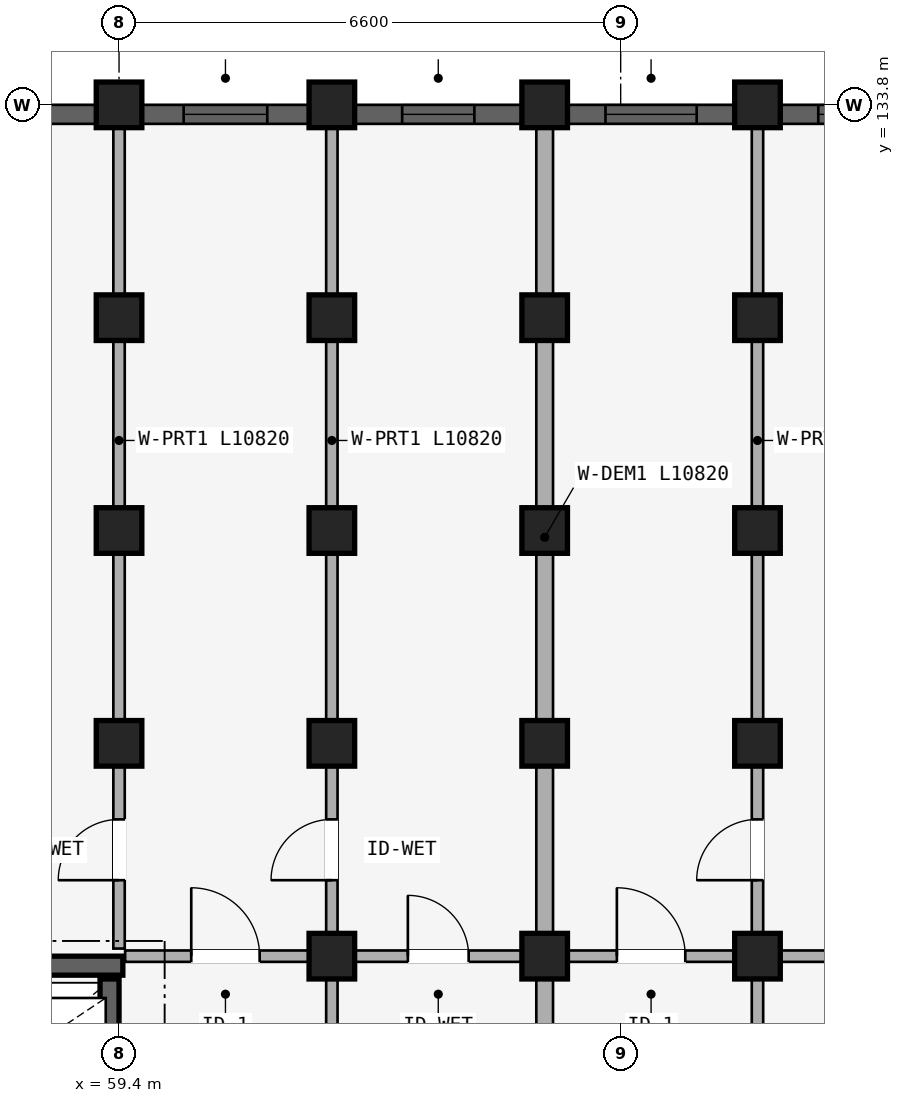
"""IFC4 building model, lengths in metres.
Left out: names, types, materials, properties, quantities, classifications, styles, units other than length and angle.
Written with IfcOpenShell. Run it as: python <this file> out.ifc"""

import sys

from ifc_helpers import new_model, si_unit, direction, frame, frame_2d, origin, origin_2d, place, context, subcontext, project, spatial, rectangle, extrude, element, fill, save


model = new_model("IFC4")
c1 = context("Model", 3, precision=1e-05, world=origin(), true_north=direction((0.0, 1.0)))
c2 = subcontext(c1, "Body", "Model", "MODEL_VIEW")
j1 = project(units=[si_unit("LENGTHUNIT", "METRE"), si_unit("PLANEANGLEUNIT", "RADIAN")], contexts=[c1])
p1 = place(None, origin())
s1 = spatial("IfcSite", under=j1, at=p1, CompositionType="ELEMENT")
p2 = place(p1, origin())
s2 = spatial("IfcBuilding", under=s1, at=p2, CompositionType="ELEMENT")
p3 = place(p2, frame((0.0, 0.0, 37.05)))
s3 = spatial("IfcBuildingStorey", under=s2, at=p3, CompositionType="ELEMENT", Elevation=37.05)
p4 = place(p3, frame((56.65, 122.475, 0.0), z_axis=(0.0, 0.0, 1.0), x_axis=(1.0, 0.0, 0.0)))
e1 = element("IfcWall", 1, at=p4, inside=s3, PredefinedType="SHEAR", context=c2, shape_type="SweptSolid", body=[
    extrude(rectangle(XDim=2.8, YDim=0.25, at=frame_2d((1.4, 0.0))), origin(), (0.0, 0.0, 1.0), 2.93),
])
p5 = place(p3, frame((59.275, 120.15, 0.0), z_axis=(0.0, 0.0, 1.0), x_axis=(0.0, 1.0, 0.0)))
e2 = element("IfcWall", 2, at=p5, inside=s3, PredefinedType="SHEAR", context=c2, shape_type="SweptSolid", body=[
    extrude(rectangle(XDim=2.15, YDim=0.25, at=frame_2d((1.075, 0.0))), origin(), (0.0, 0.0, 1.0), 2.93),
])
for number, where, z_axis, x_axis in (
    (3, (59.4, 125.4, 0.0), (0.0, 0.0, 1.0), (1.0, 0.0, 0.0)),
    (4, (59.4, 128.2, 0.0), (0.0, 0.0, 1.0), (1.0, 0.0, 0.0)),
    (5, (59.4, 131.0, 0.0), (0.0, 0.0, 1.0), (1.0, 0.0, 0.0)),
):
    element("IfcColumn", number, at=place(p3, frame(where, z_axis=z_axis, x_axis=x_axis)), inside=s3, PredefinedType="COLUMN", context=c2, shape_type="SweptSolid", body=[
        extrude(rectangle(XDim=0.6, YDim=0.6, at=origin_2d()), origin(), (0.0, 0.0, 1.0), 2.93),
    ])
p6 = place(p3, frame((59.4, 133.8, 0.0), z_axis=(0.0, 0.0, 1.0), x_axis=(1.0, 0.0, 0.0)))
e6 = element("IfcColumn", 6, at=p6, inside=s3, PredefinedType="COLUMN", context=c2, shape_type="SweptSolid", body=[
    extrude(rectangle(XDim=0.6, YDim=0.6, at=origin_2d()), origin(), (0.0, 0.0, 1.0), 2.97),
])
for number, where, z_axis, x_axis in (
    (7, (62.2, 122.6, 0.0), (0.0, 0.0, 1.0), (1.0, 0.0, 0.0)),
    (8, (62.2, 125.4, 0.0), (0.0, 0.0, 1.0), (1.0, 0.0, 0.0)),
    (9, (62.2, 128.2, 0.0), (0.0, 0.0, 1.0), (1.0, 0.0, 0.0)),
    (10, (62.2, 131.0, 0.0), (0.0, 0.0, 1.0), (1.0, 0.0, 0.0)),
):
    element("IfcColumn", number, at=place(p3, frame(where, z_axis=z_axis, x_axis=x_axis)), inside=s3, PredefinedType="COLUMN", context=c2, shape_type="SweptSolid", body=[
        extrude(rectangle(XDim=0.6, YDim=0.6, at=origin_2d()), origin(), (0.0, 0.0, 1.0), 2.93),
    ])
p7 = place(p3, frame((62.2, 133.8, 0.0), z_axis=(0.0, 0.0, 1.0), x_axis=(1.0, 0.0, 0.0)))
e11 = element("IfcColumn", 11, at=p7, inside=s3, PredefinedType="COLUMN", context=c2, shape_type="SweptSolid", body=[
    extrude(rectangle(XDim=0.6, YDim=0.6, at=origin_2d()), origin(), (0.0, 0.0, 1.0), 2.97),
])
for number, where, z_axis, x_axis in (
    (12, (65.0, 122.6, 0.0), (0.0, 0.0, 1.0), (1.0, 0.0, 0.0)),
    (13, (65.0, 125.4, 0.0), (0.0, 0.0, 1.0), (1.0, 0.0, 0.0)),
    (14, (65.0, 128.2, 0.0), (0.0, 0.0, 1.0), (1.0, 0.0, 0.0)),
    (15, (65.0, 131.0, 0.0), (0.0, 0.0, 1.0), (1.0, 0.0, 0.0)),
):
    element("IfcColumn", number, at=place(p3, frame(where, z_axis=z_axis, x_axis=x_axis)), inside=s3, PredefinedType="COLUMN", context=c2, shape_type="SweptSolid", body=[
        extrude(rectangle(XDim=0.6, YDim=0.6, at=origin_2d()), origin(), (0.0, 0.0, 1.0), 2.93),
    ])
p8 = place(p3, frame((65.0, 133.8, 0.0), z_axis=(0.0, 0.0, 1.0), x_axis=(1.0, 0.0, 0.0)))
e16 = element("IfcColumn", 16, at=p8, inside=s3, PredefinedType="COLUMN", context=c2, shape_type="SweptSolid", body=[
    extrude(rectangle(XDim=0.6, YDim=0.6, at=origin_2d()), origin(), (0.0, 0.0, 1.0), 2.97),
])
for number, where, z_axis, x_axis in (
    (17, (67.8, 122.6, 0.0), (0.0, 0.0, 1.0), (1.0, 0.0, 0.0)),
    (18, (67.8, 125.4, 0.0), (0.0, 0.0, 1.0), (1.0, 0.0, 0.0)),
    (19, (67.8, 128.2, 0.0), (0.0, 0.0, 1.0), (1.0, 0.0, 0.0)),
    (20, (67.8, 131.0, 0.0), (0.0, 0.0, 1.0), (1.0, 0.0, 0.0)),
):
    element("IfcColumn", number, at=place(p3, frame(where, z_axis=z_axis, x_axis=x_axis)), inside=s3, PredefinedType="COLUMN", context=c2, shape_type="SweptSolid", body=[
        extrude(rectangle(XDim=0.6, YDim=0.6, at=origin_2d()), origin(), (0.0, 0.0, 1.0), 2.93),
    ])
p9 = place(p3, frame((67.8, 133.8, 0.0), z_axis=(0.0, 0.0, 1.0), x_axis=(1.0, 0.0, 0.0)))
e21 = element("IfcColumn", 21, at=p9, inside=s3, PredefinedType="COLUMN", context=c2, shape_type="SweptSolid", body=[
    extrude(rectangle(XDim=0.6, YDim=0.6, at=origin_2d()), origin(), (0.0, 0.0, 1.0), 2.97),
])
p10 = place(p3, frame((59.48, 122.6, 0.0), z_axis=(0.0, 0.0, 1.0), x_axis=(1.0, 0.0, 0.0)))
e22 = element("IfcWall", 22, at=p10, inside=s3, PredefinedType="PLUMBINGWALL", context=c2, shape_type="SweptSolid", body=[
    extrude(rectangle(XDim=2.64, YDim=0.15, at=frame_2d((1.32, 0.0))), origin(), (0.0, 0.0, 1.0), 2.372),
])
p11 = place(p10, frame((0.87, 0.0, 0.0)))
e23 = element("IfcOpeningElement", 23, at=p11, cuts=e22, PredefinedType="OPENING", context=c2, shape_type="SweptSolid", body=[
    extrude(rectangle(XDim=0.9, YDim=2.1, at=frame_2d((0.45, 1.05))), frame((0.0, 0.085, 0.0), z_axis=(0.0, -1.0, 0.0), x_axis=(1.0, 0.0, 0.0)), (0.0, 0.0, 1.0), 0.17),
])
p12 = place(p3, frame((62.28, 122.6, 0.0), z_axis=(0.0, 0.0, 1.0), x_axis=(1.0, 0.0, 0.0)))
e24 = element("IfcWall", 24, at=p12, inside=s3, PredefinedType="PLUMBINGWALL", context=c2, shape_type="SweptSolid", body=[
    extrude(rectangle(XDim=2.64, YDim=0.15, at=frame_2d((1.32, 0.0))), origin(), (0.0, 0.0, 1.0), 2.372),
])
p13 = place(p12, frame((0.92, 0.0, 0.0)))
e25 = element("IfcOpeningElement", 25, at=p13, cuts=e24, PredefinedType="OPENING", context=c2, shape_type="SweptSolid", body=[
    extrude(rectangle(XDim=0.8, YDim=2.1, at=frame_2d((0.4, 1.05))), frame((0.0, 0.085, 0.0), z_axis=(0.0, -1.0, 0.0), x_axis=(1.0, 0.0, 0.0)), (0.0, 0.0, 1.0), 0.17),
])
p14 = place(p3, frame((65.08, 122.6, 0.0), z_axis=(0.0, 0.0, 1.0), x_axis=(1.0, 0.0, 0.0)))
e26 = element("IfcWall", 26, at=p14, inside=s3, PredefinedType="PLUMBINGWALL", context=c2, shape_type="SweptSolid", body=[
    extrude(rectangle(XDim=2.64, YDim=0.15, at=frame_2d((1.32, 0.0))), origin(), (0.0, 0.0, 1.0), 2.372),
])
p15 = place(p14, frame((0.87, 0.0, 0.0)))
e27 = element("IfcOpeningElement", 27, at=p15, cuts=e26, PredefinedType="OPENING", context=c2, shape_type="SweptSolid", body=[
    extrude(rectangle(XDim=0.9, YDim=2.1, at=frame_2d((0.45, 1.05))), frame((0.0, 0.085, 0.0), z_axis=(0.0, -1.0, 0.0), x_axis=(1.0, 0.0, 0.0)), (0.0, 0.0, 1.0), 0.17),
])
p16 = place(p3, frame((67.88, 122.6, 0.0), z_axis=(0.0, 0.0, 1.0), x_axis=(1.0, 0.0, 0.0)))
e28 = element("IfcWall", 28, at=p16, inside=s3, PredefinedType="PLUMBINGWALL", context=c2, shape_type="SweptSolid", body=[
    extrude(rectangle(XDim=2.64, YDim=0.15, at=frame_2d((1.32, 0.0))), origin(), (0.0, 0.0, 1.0), 2.372),
])
p17 = place(p16, frame((0.92, 0.0, 0.0)))
e29 = element("IfcOpeningElement", 29, at=p17, cuts=e28, PredefinedType="OPENING", context=c2, shape_type="SweptSolid", body=[
    extrude(rectangle(XDim=0.8, YDim=2.1, at=frame_2d((0.4, 1.05))), frame((0.0, 0.085, 0.0), z_axis=(0.0, -1.0, 0.0), x_axis=(1.0, 0.0, 0.0)), (0.0, 0.0, 1.0), 0.17),
])
p18 = place(p3, frame((59.4, 122.7, 0.0), z_axis=(0.0, 0.0, 1.0), x_axis=(0.0, 1.0, 0.0)))
e30 = element("IfcWall", 30, at=p18, inside=s3, PredefinedType="PARTITIONING", context=c2, shape_type="SweptSolid", body=[
    extrude(rectangle(XDim=10.82, YDim=0.15, at=frame_2d((5.41, 0.0))), origin(), (0.0, 0.0, 1.0), 2.372),
])
p19 = place(p18, frame((0.899, 0.0, 0.0)))
e31 = element("IfcOpeningElement", 31, at=p19, cuts=e30, PredefinedType="OPENING", context=c2, shape_type="SweptSolid", body=[
    extrude(rectangle(XDim=0.8, YDim=2.1, at=frame_2d((0.4, 1.05))), frame((0.0, 0.085, 0.0), z_axis=(0.0, -1.0, 0.0), x_axis=(1.0, 0.0, 0.0)), (0.0, 0.0, 1.0), 0.17),
])
p20 = place(p3, frame((62.2, 116.05, 0.0), z_axis=(0.0, 0.0, 1.0), x_axis=(0.0, 1.0, 0.0)))
e32 = element("IfcWall", 32, at=p20, inside=s3, PredefinedType="PARTITIONING", context=c2, shape_type="SweptSolid", body=[
    extrude(rectangle(XDim=6.53, YDim=0.15, at=frame_2d((3.265, 0.0))), origin(), (0.0, 0.0, 1.0), 2.372),
])
p21 = place(p20, frame((2.815, 0.0, 0.0)))
e33 = element("IfcOpeningElement", 33, at=p21, cuts=e32, PredefinedType="OPENING", context=c2, shape_type="SweptSolid", body=[
    extrude(rectangle(XDim=0.9, YDim=2.1, at=frame_2d((0.45, 1.05))), frame((0.0, 0.085, 0.0), z_axis=(0.0, -1.0, 0.0), x_axis=(1.0, 0.0, 0.0)), (0.0, 0.0, 1.0), 0.17),
])
p22 = place(p3, frame((62.2, 122.7, 0.0), z_axis=(0.0, 0.0, 1.0), x_axis=(0.0, 1.0, 0.0)))
e34 = element("IfcWall", 34, at=p22, inside=s3, PredefinedType="PARTITIONING", context=c2, shape_type="SweptSolid", body=[
    extrude(rectangle(XDim=10.82, YDim=0.15, at=frame_2d((5.41, 0.0))), origin(), (0.0, 0.0, 1.0), 2.372),
])
p23 = place(p22, frame((0.899, 0.0, 0.0)))
e35 = element("IfcOpeningElement", 35, at=p23, cuts=e34, PredefinedType="OPENING", context=c2, shape_type="SweptSolid", body=[
    extrude(rectangle(XDim=0.8, YDim=2.1, at=frame_2d((0.4, 1.05))), frame((0.0, 0.085, 0.0), z_axis=(0.0, -1.0, 0.0), x_axis=(1.0, 0.0, 0.0)), (0.0, 0.0, 1.0), 0.17),
])
p24 = place(p3, frame((65.0, 116.05, 0.0), z_axis=(0.0, 0.0, 1.0), x_axis=(0.0, 1.0, 0.0)))
e36 = element("IfcWall", 36, at=p24, inside=s3, PredefinedType="STANDARD", context=c2, shape_type="SweptSolid", body=[
    extrude(rectangle(XDim=6.53, YDim=0.22, at=frame_2d((3.265, 0.0))), origin(), (0.0, 0.0, 1.0), 2.372),
])
p25 = place(p3, frame((65.0, 122.7, 0.0), z_axis=(0.0, 0.0, 1.0), x_axis=(0.0, 1.0, 0.0)))
e37 = element("IfcWall", 37, at=p25, inside=s3, PredefinedType="STANDARD", context=c2, shape_type="SweptSolid", body=[
    extrude(rectangle(XDim=10.82, YDim=0.22, at=frame_2d((5.41, 0.0))), origin(), (0.0, 0.0, 1.0), 2.372),
])
p26 = place(p3, frame((67.8, 116.05, 0.0), z_axis=(0.0, 0.0, 1.0), x_axis=(0.0, 1.0, 0.0)))
e38 = element("IfcWall", 38, at=p26, inside=s3, PredefinedType="PARTITIONING", context=c2, shape_type="SweptSolid", body=[
    extrude(rectangle(XDim=6.53, YDim=0.15, at=frame_2d((3.265, 0.0))), origin(), (0.0, 0.0, 1.0), 2.372),
])
p27 = place(p26, frame((2.815, 0.0, 0.0)))
e39 = element("IfcOpeningElement", 39, at=p27, cuts=e38, PredefinedType="OPENING", context=c2, shape_type="SweptSolid", body=[
    extrude(rectangle(XDim=0.9, YDim=2.1, at=frame_2d((0.45, 1.05))), frame((0.0, 0.085, 0.0), z_axis=(0.0, -1.0, 0.0), x_axis=(1.0, 0.0, 0.0)), (0.0, 0.0, 1.0), 0.17),
])
p28 = place(p3, frame((67.8, 122.7, 0.0), z_axis=(0.0, 0.0, 1.0), x_axis=(0.0, 1.0, 0.0)))
e40 = element("IfcWall", 40, at=p28, inside=s3, PredefinedType="PARTITIONING", context=c2, shape_type="SweptSolid", body=[
    extrude(rectangle(XDim=10.82, YDim=0.15, at=frame_2d((5.41, 0.0))), origin(), (0.0, 0.0, 1.0), 2.372),
])
p29 = place(p28, frame((0.899, 0.0, 0.0)))
e41 = element("IfcOpeningElement", 41, at=p29, cuts=e40, PredefinedType="OPENING", context=c2, shape_type="SweptSolid", body=[
    extrude(rectangle(XDim=0.8, YDim=2.1, at=frame_2d((0.4, 1.05))), frame((0.0, 0.085, 0.0), z_axis=(0.0, -1.0, 0.0), x_axis=(1.0, 0.0, 0.0)), (0.0, 0.0, 1.0), 0.17),
])
p30 = place(p3, frame((54.104, 133.675, 0.0), z_axis=(0.0, 0.0, 1.0), x_axis=(1.0, 0.0, 0.0)))
e42 = element("IfcWall", 42, at=p30, inside=s3, PredefinedType="STANDARD", context=c2, shape_type="SweptSolid", body=[
    extrude(rectangle(XDim=4.993, YDim=0.25, at=frame_2d((2.497, 0.0))), origin(), (0.0, 0.0, 1.0), 2.48),
])
p31 = place(p30, frame((1.896, 0.0, 0.78)))
e43 = element("IfcOpeningElement", 43, at=p31, cuts=e42, PredefinedType="OPENING", context=c2, shape_type="SweptSolid", body=[
    extrude(rectangle(XDim=1.2, YDim=1.5, at=frame_2d((0.6, 0.75))), frame((0.0, 0.135, 0.0), z_axis=(0.0, -1.0, 0.0), x_axis=(1.0, 0.0, 0.0)), (0.0, 0.0, 1.0), 0.27),
])
p32 = place(p3, frame((59.704, 133.675, 0.0), z_axis=(0.0, 0.0, 1.0), x_axis=(1.0, 0.0, 0.0)))
e44 = element("IfcWall", 44, at=p32, inside=s3, PredefinedType="STANDARD", context=c2, shape_type="SweptSolid", body=[
    extrude(rectangle(XDim=2.193, YDim=0.25, at=frame_2d((1.096, 0.0))), origin(), (0.0, 0.0, 1.0), 2.48),
])
p33 = place(p32, frame((0.546, 0.0, 0.83)))
e45 = element("IfcOpeningElement", 45, at=p33, cuts=e44, PredefinedType="OPENING", context=c2, shape_type="SweptSolid", body=[
    extrude(rectangle(XDim=1.1, YDim=1.45, at=frame_2d((0.55, 0.725))), frame((0.0, 0.135, 0.0), z_axis=(0.0, -1.0, 0.0), x_axis=(1.0, 0.0, 0.0)), (0.0, 0.0, 1.0), 0.27),
])
p34 = place(p3, frame((62.503, 133.675, 0.0), z_axis=(0.0, 0.0, 1.0), x_axis=(1.0, 0.0, 0.0)))
e46 = element("IfcWall", 46, at=p34, inside=s3, PredefinedType="STANDARD", context=c2, shape_type="SweptSolid", body=[
    extrude(rectangle(XDim=2.193, YDim=0.25, at=frame_2d((1.097, 0.0))), origin(), (0.0, 0.0, 1.0), 2.48),
])
p35 = place(p34, frame((0.622, 0.0, 0.88)))
e47 = element("IfcOpeningElement", 47, at=p35, cuts=e46, PredefinedType="OPENING", context=c2, shape_type="SweptSolid", body=[
    extrude(rectangle(XDim=0.95, YDim=1.35, at=frame_2d((0.475, 0.675))), frame((0.0, 0.135, 0.0), z_axis=(0.0, -1.0, 0.0), x_axis=(1.0, 0.0, 0.0)), (0.0, 0.0, 1.0), 0.27),
])
p36 = place(p3, frame((65.303, 133.675, 0.0), z_axis=(0.0, 0.0, 1.0), x_axis=(1.0, 0.0, 0.0)))
e48 = element("IfcWall", 48, at=p36, inside=s3, PredefinedType="STANDARD", context=c2, shape_type="SweptSolid", body=[
    extrude(rectangle(XDim=2.193, YDim=0.25, at=frame_2d((1.097, 0.0))), origin(), (0.0, 0.0, 1.0), 2.48),
])
p37 = place(p36, frame((0.497, 0.0, 0.78)))
e49 = element("IfcOpeningElement", 49, at=p37, cuts=e48, PredefinedType="OPENING", context=c2, shape_type="SweptSolid", body=[
    extrude(rectangle(XDim=1.2, YDim=1.5, at=frame_2d((0.6, 0.75))), frame((0.0, 0.135, 0.0), z_axis=(0.0, -1.0, 0.0), x_axis=(1.0, 0.0, 0.0)), (0.0, 0.0, 1.0), 0.27),
])
p38 = place(p3, frame((68.104, 133.675, 0.0), z_axis=(0.0, 0.0, 1.0), x_axis=(1.0, 0.0, 0.0)))
e50 = element("IfcWall", 50, at=p38, inside=s3, PredefinedType="STANDARD", context=c2, shape_type="SweptSolid", body=[
    extrude(rectangle(XDim=2.193, YDim=0.25, at=frame_2d((1.096, 0.0))), origin(), (0.0, 0.0, 1.0), 2.48),
])
p39 = place(p38, frame((0.497, 0.0, 0.78)))
e51 = element("IfcOpeningElement", 51, at=p39, cuts=e50, PredefinedType="OPENING", context=c2, shape_type="SweptSolid", body=[
    extrude(rectangle(XDim=1.2, YDim=1.5, at=frame_2d((0.6, 0.75))), frame((0.0, 0.135, 0.0), z_axis=(0.0, -1.0, 0.0), x_axis=(1.0, 0.0, 0.0)), (0.0, 0.0, 1.0), 0.27),
])
p40 = place(p33, origin())
e52 = element("IfcWindow", 52, at=p40, inside=s3, PartitioningType="SINGLE_PANEL", PredefinedType="WINDOW", context=c2, shape_type="SweptSolid", body=[
    extrude(rectangle(XDim=1.1, YDim=1.45, at=frame_2d((0.55, 0.725))), frame((0.0, 0.03, 0.0), z_axis=(0.0, -1.0, 0.0), x_axis=(1.0, 0.0, 0.0)), (0.0, 0.0, 1.0), 0.06),
])
fill(e45, e52)
p41 = place(p35, origin())
e53 = element("IfcWindow", 53, at=p41, inside=s3, PartitioningType="SINGLE_PANEL", PredefinedType="WINDOW", context=c2, shape_type="SweptSolid", body=[
    extrude(rectangle(XDim=0.95, YDim=1.35, at=frame_2d((0.475, 0.675))), frame((0.0, 0.03, 0.0), z_axis=(0.0, -1.0, 0.0), x_axis=(1.0, 0.0, 0.0)), (0.0, 0.0, 1.0), 0.06),
])
fill(e47, e53)
p42 = place(p37, origin())
e54 = element("IfcWindow", 54, at=p42, inside=s3, PartitioningType="SINGLE_PANEL", PredefinedType="WINDOW", context=c2, shape_type="SweptSolid", body=[
    extrude(rectangle(XDim=1.2, YDim=1.5, at=frame_2d((0.6, 0.75))), frame((0.0, 0.03, 0.0), z_axis=(0.0, -1.0, 0.0), x_axis=(1.0, 0.0, 0.0)), (0.0, 0.0, 1.0), 0.06),
])
fill(e49, e54)
p43 = place(p39, origin())
e55 = element("IfcWindow", 55, at=p43, inside=s3, PartitioningType="SINGLE_PANEL", PredefinedType="WINDOW", context=c2, shape_type="SweptSolid", body=[
    extrude(rectangle(XDim=1.2, YDim=1.5, at=frame_2d((0.6, 0.75))), frame((0.0, 0.03, 0.0), z_axis=(0.0, -1.0, 0.0), x_axis=(1.0, 0.0, 0.0)), (0.0, 0.0, 1.0), 0.06),
])
fill(e51, e55)
p44 = place(p11, origin())
e56 = element("IfcDoor", 56, at=p44, inside=s3, OperationType="SINGLE_SWING_LEFT", PredefinedType="DOOR", context=c2, shape_type="SweptSolid", body=[
    extrude(rectangle(XDim=0.9, YDim=2.1, at=frame_2d((0.45, 1.05))), frame((0.0, 0.025, 0.0), z_axis=(0.0, -1.0, 0.0), x_axis=(1.0, 0.0, 0.0)), (0.0, 0.0, 1.0), 0.05),
])
fill(e23, e56)
p45 = place(p13, origin())
e57 = element("IfcDoor", 57, at=p45, inside=s3, OperationType="SINGLE_SWING_LEFT", PredefinedType="DOOR", context=c2, shape_type="SweptSolid", body=[
    extrude(rectangle(XDim=0.8, YDim=2.1, at=frame_2d((0.4, 1.05))), frame((0.0, 0.025, 0.0), z_axis=(0.0, -1.0, 0.0), x_axis=(1.0, 0.0, 0.0)), (0.0, 0.0, 1.0), 0.05),
])
fill(e25, e57)
p46 = place(p15, origin())
e58 = element("IfcDoor", 58, at=p46, inside=s3, OperationType="SINGLE_SWING_LEFT", PredefinedType="DOOR", context=c2, shape_type="SweptSolid", body=[
    extrude(rectangle(XDim=0.9, YDim=2.1, at=frame_2d((0.45, 1.05))), frame((0.0, 0.025, 0.0), z_axis=(0.0, -1.0, 0.0), x_axis=(1.0, 0.0, 0.0)), (0.0, 0.0, 1.0), 0.05),
])
fill(e27, e58)
p47 = place(p19, frame((0.8, 0.0, 0.0), z_axis=(0.0, 0.0, 1.0), x_axis=(-1.0, 0.0, 0.0)))
e59 = element("IfcDoor", 59, at=p47, inside=s3, OperationType="SINGLE_SWING_RIGHT", PredefinedType="DOOR", context=c2, shape_type="SweptSolid", body=[
    extrude(rectangle(XDim=0.8, YDim=2.1, at=frame_2d((0.4, 1.05))), frame((0.0, 0.025, 0.0), z_axis=(0.0, -1.0, 0.0), x_axis=(1.0, 0.0, 0.0)), (0.0, 0.0, 1.0), 0.05),
])
fill(e31, e59)
p48 = place(p23, origin())
e60 = element("IfcDoor", 60, at=p48, inside=s3, OperationType="SINGLE_SWING_LEFT", PredefinedType="DOOR", context=c2, shape_type="SweptSolid", body=[
    extrude(rectangle(XDim=0.8, YDim=2.1, at=frame_2d((0.4, 1.05))), frame((0.0, 0.025, 0.0), z_axis=(0.0, -1.0, 0.0), x_axis=(1.0, 0.0, 0.0)), (0.0, 0.0, 1.0), 0.05),
])
fill(e35, e60)
p49 = place(p29, frame((0.8, 0.0, 0.0), z_axis=(0.0, 0.0, 1.0), x_axis=(-1.0, 0.0, 0.0)))
e61 = element("IfcDoor", 61, at=p49, inside=s3, OperationType="SINGLE_SWING_RIGHT", PredefinedType="DOOR", context=c2, shape_type="SweptSolid", body=[
    extrude(rectangle(XDim=0.8, YDim=2.1, at=frame_2d((0.4, 1.05))), frame((0.0, 0.025, 0.0), z_axis=(0.0, -1.0, 0.0), x_axis=(1.0, 0.0, 0.0)), (0.0, 0.0, 1.0), 0.05),
])
fill(e41, e61)
save(model, sys.argv[1])
